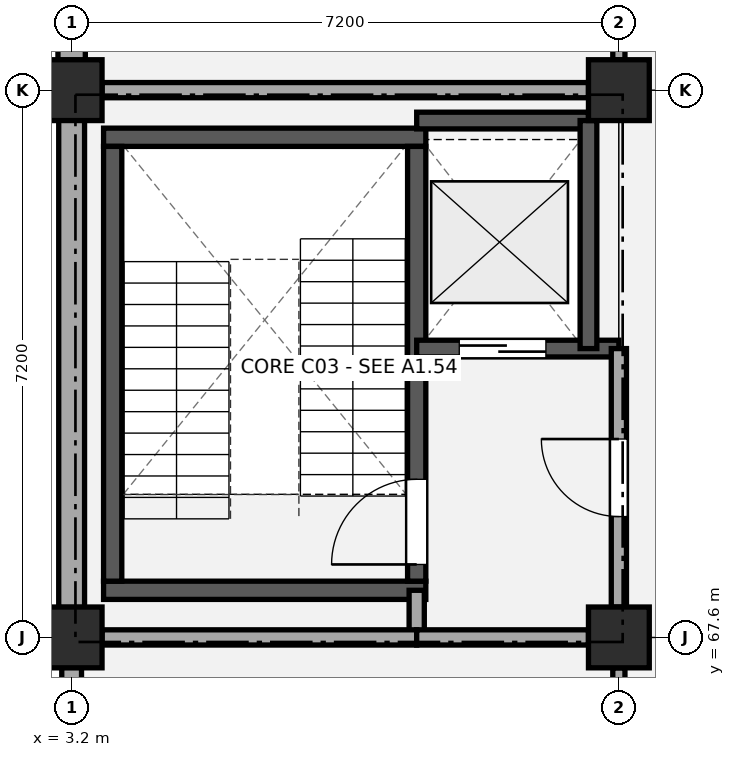
"""IFC4 building model, lengths in metres.
Left out: names, types, materials, properties, quantities, classifications, styles, units other than length and angle.
Written with IfcOpenShell. Run it as: python <this file> out.ifc"""

import sys

from ifc_helpers import new_model, si_unit, direction, frame, frame_2d, origin, origin_2d, place, context, subcontext, project, spatial, rectangle, extrude, element, fill, save


model = new_model("IFC4")
c1 = context("Model", 3, precision=1e-05, world=origin(), true_north=direction((0.0, 1.0)))
c2 = subcontext(c1, "Body", "Model", "MODEL_VIEW")
j1 = project(units=[si_unit("LENGTHUNIT", "METRE"), si_unit("PLANEANGLEUNIT", "RADIAN")], contexts=[c1])
p1 = place(None, origin())
s1 = spatial("IfcSite", under=j1, at=p1, CompositionType="ELEMENT")
p2 = place(p1, origin())
s2 = spatial("IfcBuilding", under=s1, at=p2, CompositionType="ELEMENT")
p3 = place(p2, frame((0.0, 0.0, 9.18)))
s3 = spatial("IfcBuildingStorey", under=s2, at=p3, CompositionType="ELEMENT", Elevation=9.18)
for number, where, z_axis, x_axis in (
    (1, (3.2, 67.6, 0.0), (0.0, 0.0, 1.0), (1.0, 0.0, 0.0)),
    (2, (3.2, 74.8, 0.0), (0.0, 0.0, 1.0), (1.0, 0.0, 0.0)),
    (3, (10.4, 67.6, 0.0), (0.0, 0.0, 1.0), (1.0, 0.0, 0.0)),
    (4, (10.4, 74.8, 0.0), (0.0, 0.0, 1.0), (1.0, 0.0, 0.0)),
):
    element("IfcColumn", number, at=place(p3, frame(where, z_axis=z_axis, x_axis=x_axis)), inside=s3, PredefinedType="COLUMN", context=c2, shape_type="SweptSolid", body=[
        extrude(rectangle(XDim=0.8, YDim=0.8, at=origin_2d()), origin(), (0.0, 0.0, 1.0), 4.32),
    ])
p4 = place(p3, frame((3.2, 60.795, 0.0), z_axis=(0.0, 0.0, 1.0), x_axis=(0.0, 1.0, 0.0)))
e5 = element("IfcWall", 5, at=p4, inside=s3, PredefinedType="STANDARD", context=c2, shape_type="SweptSolid", body=[
    extrude(rectangle(XDim=6.41, YDim=0.26, at=frame_2d((3.205, 0.0))), origin(), (0.0, 0.0, 1.0), 3.46),
])
p5 = place(p4, frame((2.18, 0.0, 0.95)))
e6 = element("IfcOpeningElement", 6, at=p5, cuts=e5, PredefinedType="OPENING", context=c2, shape_type="SweptSolid", body=[
    extrude(rectangle(XDim=2.05, YDim=1.75, at=frame_2d((1.025, 0.875))), frame((0.0, 0.14, 0.0), z_axis=(0.0, -1.0, 0.0), x_axis=(1.0, 0.0, 0.0)), (0.0, 0.0, 1.0), 0.28),
])
p6 = place(p3, frame((3.2, 67.995, 0.0), z_axis=(0.0, 0.0, 1.0), x_axis=(0.0, 1.0, 0.0)))
e7 = element("IfcWall", 7, at=p6, inside=s3, PredefinedType="STANDARD", context=c2, shape_type="SweptSolid", body=[
    extrude(rectangle(XDim=6.41, YDim=0.34, at=frame_2d((3.205, 0.0))), origin(), (0.0, 0.0, 1.0), 3.48),
])
p7 = place(p3, frame((3.2, 75.195, 0.0), z_axis=(0.0, 0.0, 1.0), x_axis=(0.0, 1.0, 0.0)))
e8 = element("IfcWall", 8, at=p7, inside=s3, PredefinedType="STANDARD", context=c2, shape_type="SweptSolid", body=[
    extrude(rectangle(XDim=6.41, YDim=0.36, at=frame_2d((3.205, 0.0))), origin(), (0.0, 0.0, 1.0), 3.46),
])
p8 = place(p7, frame((2.08, 0.0, 0.95)))
e9 = element("IfcOpeningElement", 9, at=p8, cuts=e8, PredefinedType="OPENING", context=c2, shape_type="SweptSolid", body=[
    extrude(rectangle(XDim=2.25, YDim=1.8, at=frame_2d((1.125, 0.9))), frame((0.0, 0.19, 0.0), z_axis=(0.0, -1.0, 0.0), x_axis=(1.0, 0.0, 0.0)), (0.0, 0.0, 1.0), 0.38),
])
for number, where, z_axis, x_axis in (
    (10, (3.62, 68.22, 0.0), (0.0, 0.0, 1.0), (1.0, 0.0, 0.0)),
    (11, (3.62, 74.18, 0.0), (0.0, 0.0, 1.0), (1.0, 0.0, 0.0)),
):
    element("IfcWall", number, at=place(p3, frame(where, z_axis=z_axis, x_axis=x_axis)), inside=s3, PredefinedType="SHEAR", context=c2, shape_type="SweptSolid", body=[
        extrude(rectangle(XDim=4.24, YDim=0.24, at=frame_2d((2.12, 0.0))), origin(), (0.0, 0.0, 1.0), 4.04),
    ])
p9 = place(p3, frame((3.74, 68.34, 0.0), z_axis=(0.0, 0.0, 1.0), x_axis=(0.0, 1.0, 0.0)))
e12 = element("IfcWall", 12, at=p9, inside=s3, PredefinedType="SHEAR", context=c2, shape_type="SweptSolid", body=[
    extrude(rectangle(XDim=5.72, YDim=0.24, at=frame_2d((2.86, 0.0))), origin(), (0.0, 0.0, 1.0), 4.04),
])
p10 = place(p3, frame((7.74, 68.34, 0.0), z_axis=(0.0, 0.0, 1.0), x_axis=(0.0, 1.0, 0.0)))
e13 = element("IfcWall", 13, at=p10, inside=s3, PredefinedType="SHEAR", context=c2, shape_type="SweptSolid", body=[
    extrude(rectangle(XDim=5.72, YDim=0.24, at=frame_2d((2.86, 0.0))), origin(), (0.0, 0.0, 1.0), 4.04),
])
p11 = place(p10, frame((0.22, 0.0, 0.0)))
e14 = element("IfcOpeningElement", 14, at=p11, cuts=e13, PredefinedType="OPENING", context=c2, shape_type="SweptSolid", body=[
    extrude(rectangle(XDim=1.12, YDim=2.15, at=frame_2d((0.56, 1.075))), frame((0.0, 0.13, 0.0), z_axis=(0.0, -1.0, 0.0), x_axis=(1.0, 0.0, 0.0)), (0.0, 0.0, 1.0), 0.26),
])
p12 = place(p3, frame((7.74, 71.4, 0.0), z_axis=(0.0, 0.0, 1.0), x_axis=(1.0, 0.0, 0.0)))
e15 = element("IfcWall", 15, at=p12, inside=s3, PredefinedType="SHEAR", context=c2, shape_type="SweptSolid", body=[
    extrude(rectangle(XDim=2.66, YDim=0.22, at=frame_2d((1.33, 0.0))), origin(), (0.0, 0.0, 1.0), 4.04),
])
p13 = place(p12, frame((0.56, 0.0, 0.0)))
e16 = element("IfcOpeningElement", 16, at=p13, cuts=e15, PredefinedType="OPENING", context=c2, shape_type="SweptSolid", body=[
    extrude(rectangle(XDim=1.14, YDim=2.15, at=frame_2d((0.57, 1.075))), frame((0.0, 0.12, 0.0), z_axis=(0.0, -1.0, 0.0), x_axis=(1.0, 0.0, 0.0)), (0.0, 0.0, 1.0), 0.24),
])
p14 = place(p3, frame((7.74, 74.4, 0.0), z_axis=(0.0, 0.0, 1.0), x_axis=(1.0, 0.0, 0.0)))
e17 = element("IfcWall", 17, at=p14, inside=s3, PredefinedType="SHEAR", context=c2, shape_type="SweptSolid", body=[
    extrude(rectangle(XDim=2.26, YDim=0.22, at=frame_2d((1.13, 0.0))), origin(), (0.0, 0.0, 1.0), 4.04),
])
p15 = place(p3, frame((10.0, 71.4, 0.0), z_axis=(0.0, 0.0, 1.0), x_axis=(0.0, 1.0, 0.0)))
e18 = element("IfcWall", 18, at=p15, inside=s3, PredefinedType="SHEAR", context=c2, shape_type="SweptSolid", body=[
    extrude(rectangle(XDim=3.0, YDim=0.22, at=frame_2d((1.5, 0.0))), origin(), (0.0, 0.0, 1.0), 4.04),
])
p16 = place(p3, frame((7.74, 67.6, 0.0), z_axis=(0.0, 0.0, 1.0), x_axis=(0.0, 1.0, 0.0)))
e19 = element("IfcWall", 19, at=p16, inside=s3, PredefinedType="PARTITIONING", context=c2, shape_type="SweptSolid", body=[
    extrude(rectangle(XDim=0.62, YDim=0.2, at=frame_2d((0.31, 0.0))), origin(), (0.0, 0.0, 1.0), 3.41),
])
p17 = place(p3, frame((10.4, 68.0, 0.0), z_axis=(0.0, 0.0, 1.0), x_axis=(0.0, 1.0, 0.0)))
e20 = element("IfcWall", 20, at=p17, inside=s3, PredefinedType="PARTITIONING", context=c2, shape_type="SweptSolid", body=[
    extrude(rectangle(XDim=3.4, YDim=0.2, at=frame_2d((1.7, 0.0))), origin(), (0.0, 0.0, 1.0), 3.41),
])
p18 = place(p17, frame((1.19, 0.0, 0.0)))
e21 = element("IfcOpeningElement", 21, at=p18, cuts=e20, PredefinedType="OPENING", context=c2, shape_type="SweptSolid", body=[
    extrude(rectangle(XDim=1.02, YDim=2.15, at=frame_2d((0.51, 1.075))), frame((0.0, 0.11, 0.0), z_axis=(0.0, -1.0, 0.0), x_axis=(1.0, 0.0, 0.0)), (0.0, 0.0, 1.0), 0.22),
])
p19 = place(p3, frame((3.6, 67.6, 0.0), z_axis=(0.0, 0.0, 1.0), x_axis=(1.0, 0.0, 0.0)))
e22 = element("IfcWall", 22, at=p19, inside=s3, PredefinedType="PARTITIONING", context=c2, shape_type="SweptSolid", body=[
    extrude(rectangle(XDim=4.14, YDim=0.2, at=frame_2d((2.07, 0.0))), origin(), (0.0, 0.0, 1.0), 3.41),
])
p20 = place(p3, frame((7.74, 67.6, 0.0), z_axis=(0.0, 0.0, 1.0), x_axis=(1.0, 0.0, 0.0)))
e23 = element("IfcWall", 23, at=p20, inside=s3, PredefinedType="PARTITIONING", context=c2, shape_type="SweptSolid", body=[
    extrude(rectangle(XDim=2.26, YDim=0.2, at=frame_2d((1.13, 0.0))), origin(), (0.0, 0.0, 1.0), 3.41),
])
p21 = place(p3, frame((3.6, 74.8, 0.0), z_axis=(0.0, 0.0, 1.0), x_axis=(1.0, 0.0, 0.0)))
e24 = element("IfcWall", 24, at=p21, inside=s3, PredefinedType="PARTITIONING", context=c2, shape_type="SweptSolid", body=[
    extrude(rectangle(XDim=6.4, YDim=0.2, at=frame_2d((3.2, 0.0))), origin(), (0.0, 0.0, 1.0), 3.36),
])
p22 = place(p3, frame((10.4, 60.8, 0.0), z_axis=(0.0, 0.0, 1.0), x_axis=(0.0, 1.0, 0.0)))
e25 = element("IfcWall", 25, at=p22, inside=s3, PredefinedType="PARTITIONING", context=c2, shape_type="SweptSolid", body=[
    extrude(rectangle(XDim=6.4, YDim=0.16, at=frame_2d((3.2, 0.0))), origin(), (0.0, 0.0, 1.0), 3.36),
])
p23 = place(p22, frame((2.72, 0.0, 0.0)))
e26 = element("IfcOpeningElement", 26, at=p23, cuts=e25, PredefinedType="OPENING", context=c2, shape_type="SweptSolid", body=[
    extrude(rectangle(XDim=0.96, YDim=2.1, at=frame_2d((0.48, 1.05))), frame((0.0, 0.09, 0.0), z_axis=(0.0, -1.0, 0.0), x_axis=(1.0, 0.0, 0.0)), (0.0, 0.0, 1.0), 0.18),
])
p24 = place(p3, frame((10.4, 75.2, 0.0), z_axis=(0.0, 0.0, 1.0), x_axis=(0.0, 1.0, 0.0)))
e27 = element("IfcWall", 27, at=p24, inside=s3, PredefinedType="PARTITIONING", context=c2, shape_type="SweptSolid", body=[
    extrude(rectangle(XDim=6.4, YDim=0.16, at=frame_2d((3.2, 0.0))), origin(), (0.0, 0.0, 1.0), 3.36),
])
p25 = place(p24, frame((2.48, 0.0, 0.0)))
e28 = element("IfcOpeningElement", 28, at=p25, cuts=e27, PredefinedType="OPENING", context=c2, shape_type="SweptSolid", body=[
    extrude(rectangle(XDim=1.44, YDim=2.2, at=frame_2d((0.72, 1.1))), frame((0.0, 0.09, 0.0), z_axis=(0.0, -1.0, 0.0), x_axis=(1.0, 0.0, 0.0)), (0.0, 0.0, 1.0), 0.18),
])
p26 = place(p11, origin())
e29 = element("IfcDoor", 29, at=p26, inside=s3, OperationType="SINGLE_SWING_LEFT", PredefinedType="DOOR", context=c2, shape_type="SweptSolid", body=[
    extrude(rectangle(XDim=1.12, YDim=2.15, at=frame_2d((0.56, 1.075))), frame((0.0, 0.025, 0.0), z_axis=(0.0, -1.0, 0.0), x_axis=(1.0, 0.0, 0.0)), (0.0, 0.0, 1.0), 0.05),
])
fill(e14, e29)
p27 = place(p13, origin())
e30 = element("IfcDoor", 30, at=p27, inside=s3, OperationType="SLIDING_TO_LEFT", PredefinedType="DOOR", context=c2, shape_type="SweptSolid", body=[
    extrude(rectangle(XDim=1.14, YDim=2.15, at=frame_2d((0.57, 1.075))), frame((0.0, 0.025, 0.0), z_axis=(0.0, -1.0, 0.0), x_axis=(1.0, 0.0, 0.0)), (0.0, 0.0, 1.0), 0.05),
])
fill(e16, e30)
p28 = place(p18, origin())
e31 = element("IfcDoor", 31, at=p28, inside=s3, OperationType="SINGLE_SWING_RIGHT", PredefinedType="DOOR", context=c2, shape_type="SweptSolid", body=[
    extrude(rectangle(XDim=1.02, YDim=2.15, at=frame_2d((0.51, 1.075))), frame((0.0, 0.025, 0.0), z_axis=(0.0, -1.0, 0.0), x_axis=(1.0, 0.0, 0.0)), (0.0, 0.0, 1.0), 0.05),
])
fill(e21, e31)
save(model, sys.argv[1])
